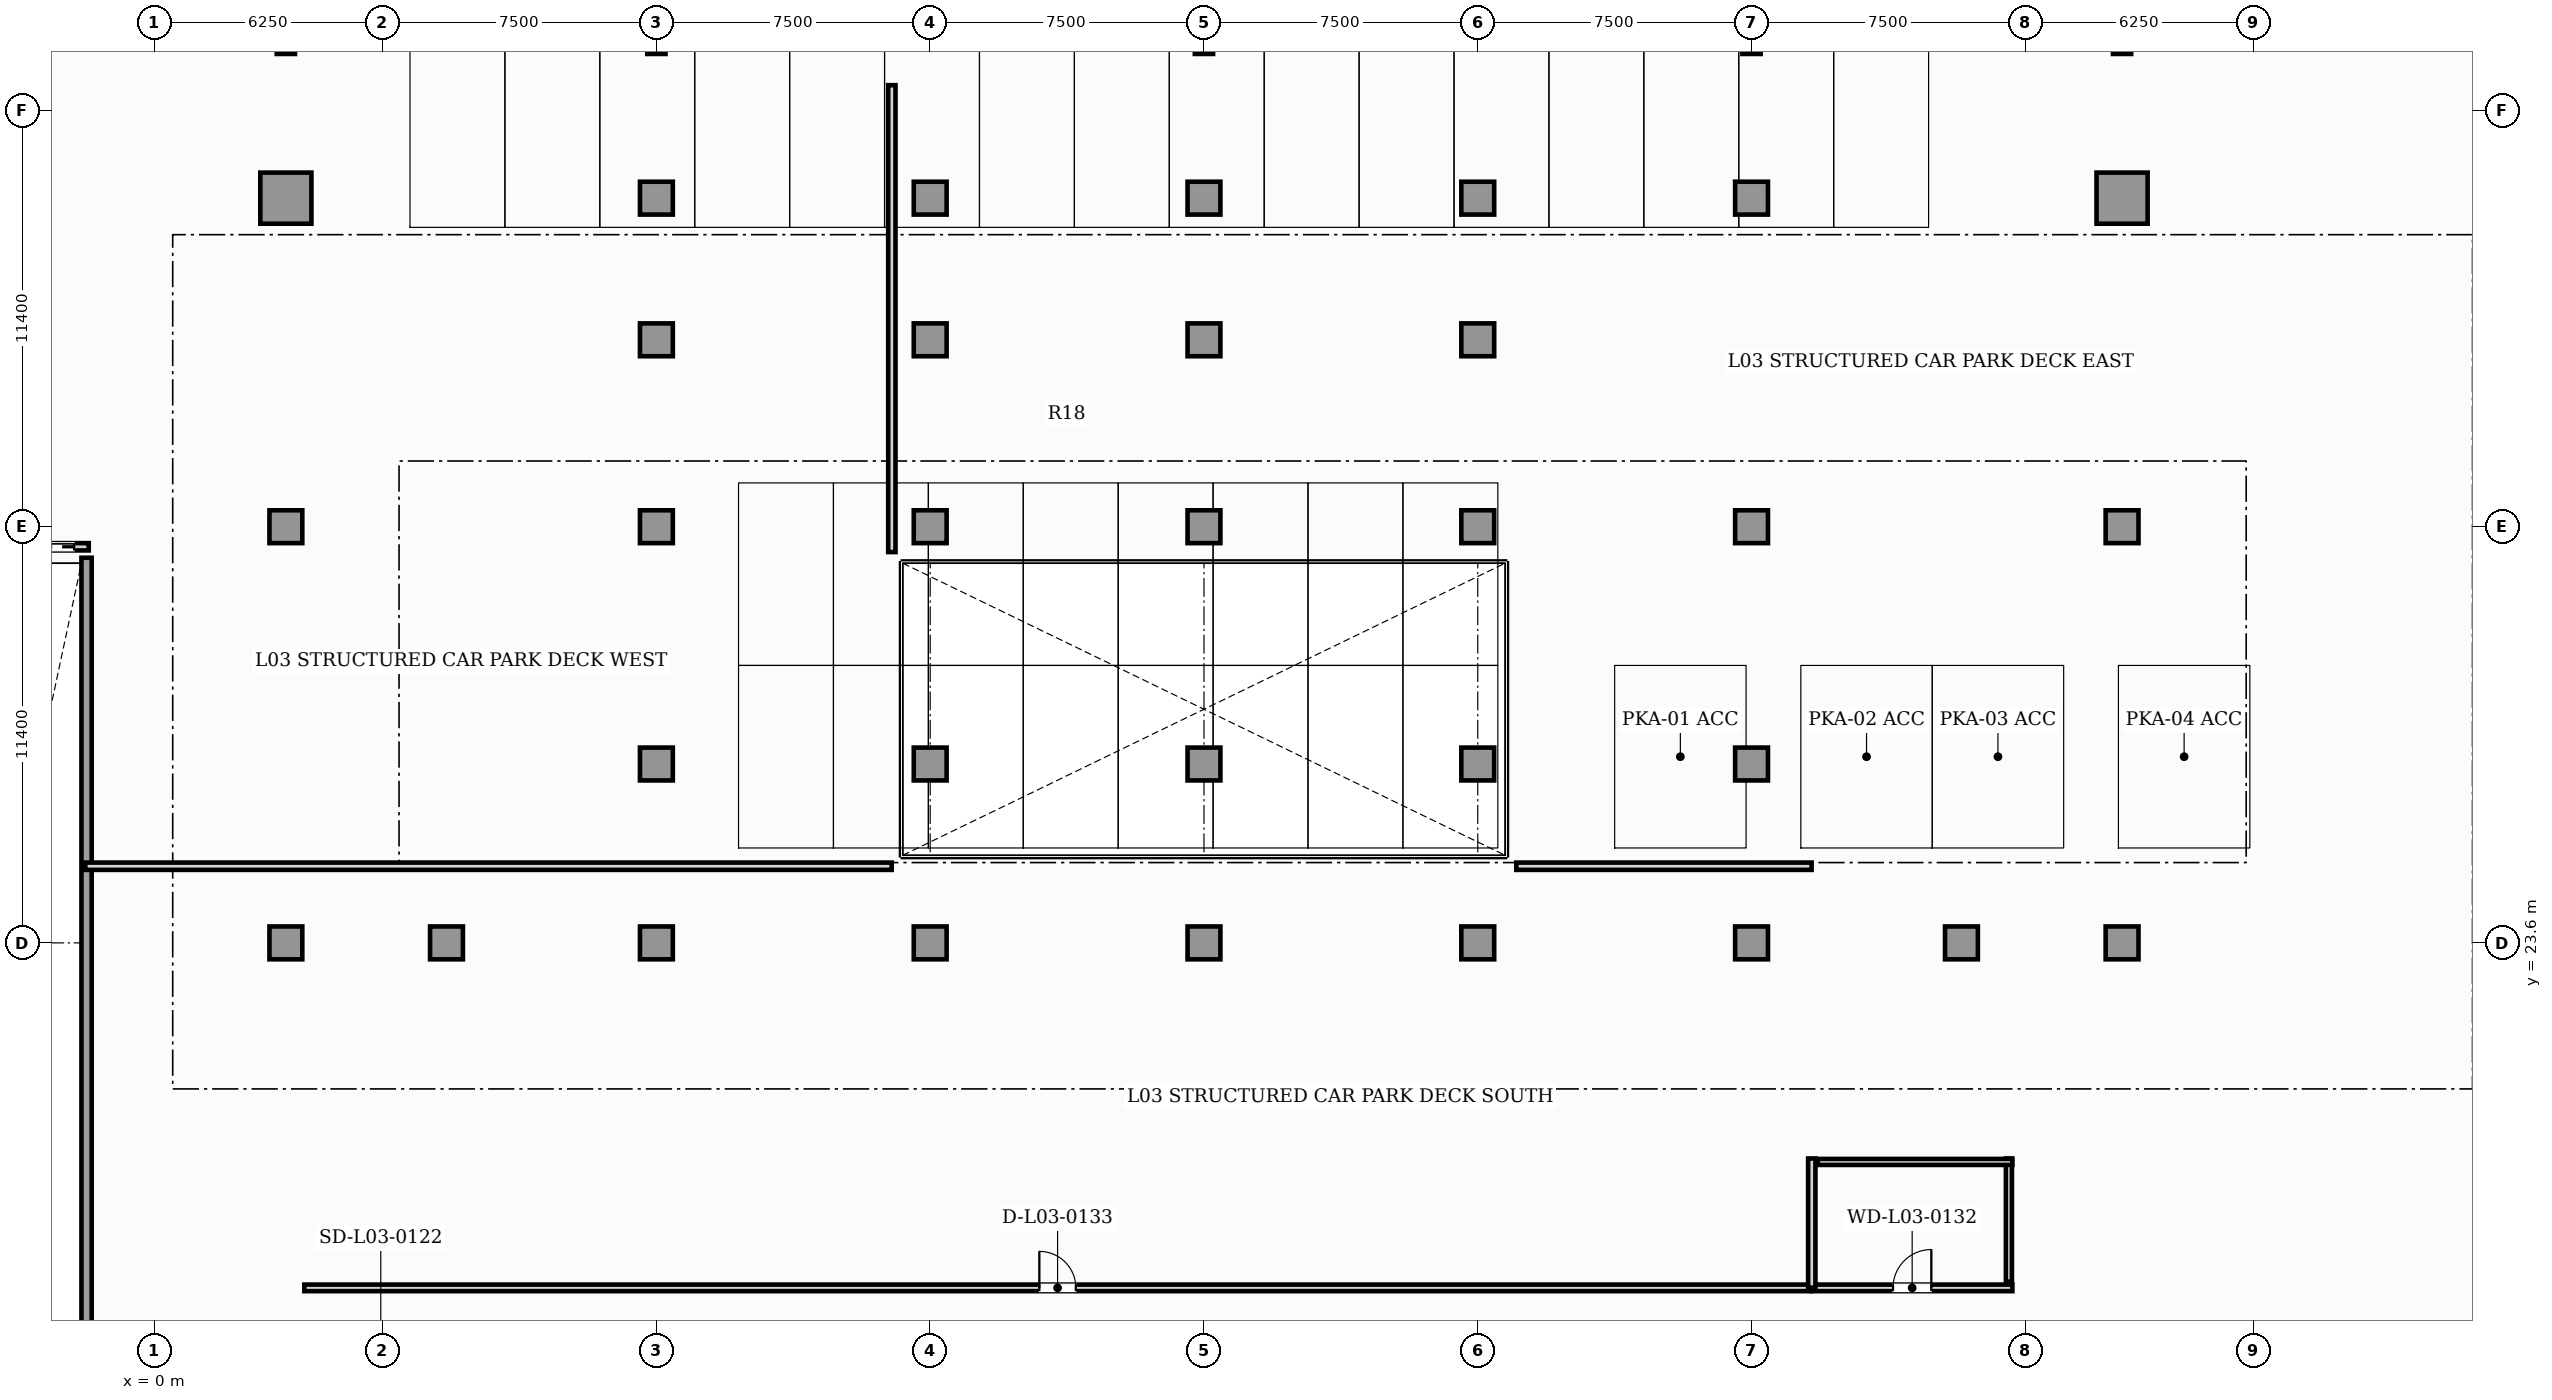
"""IFC4 building model, lengths in metres.
Left out: names, types, materials, properties, quantities, classifications, styles, units other than length and angle.
Written with IfcOpenShell. Run it as: python <this file> out.ifc"""

import sys

from ifc_helpers import new_model, si_unit, direction, frame, frame_2d, origin, origin_2d, place, context, subcontext, project, spatial, rectangle, hollow_rectangle, extrude, element, fill, save


model = new_model("IFC4")
c1 = context("Model", 3, precision=1e-05, world=origin(), true_north=direction((0.0, 1.0)))
c2 = subcontext(c1, "Body", "Model", "MODEL_VIEW")
j1 = project(units=[si_unit("LENGTHUNIT", "METRE"), si_unit("PLANEANGLEUNIT", "RADIAN")], contexts=[c1])
p1 = place(None, origin())
s1 = spatial("IfcSite", under=j1, at=p1, CompositionType="ELEMENT")
p2 = place(p1, origin())
s2 = spatial("IfcBuilding", under=s1, at=p2, CompositionType="ELEMENT")
p3 = place(p2, frame((0.0, 0.0, 15.0)))
s3 = spatial("IfcBuildingStorey", under=s2, at=p3, CompositionType="ELEMENT", Elevation=15.0)
p4 = place(p3, frame((-1.86, 3.88, 0.0), z_axis=(0.0, 0.0, 1.0), x_axis=(0.0, 1.0, 0.0)))
e1 = element("IfcWall", 1, at=p4, inside=s3, PredefinedType="SHEAR", context=c2, shape_type="SweptSolid", body=[
    extrude(rectangle(XDim=30.27, YDim=0.28, at=frame_2d((15.135, 0.0))), origin(), (0.0, 0.0, 1.0), 4.5),
])
for number, where, z_axis, x_axis in (
    (2, (53.9, 44.0, 0.0), (0.0, 0.0, 1.0), (1.0, 0.0, 0.0)),
    (3, (3.6, 44.0, 0.0), (0.0, 0.0, 1.0), (1.0, 0.0, 0.0)),
):
    element("IfcColumn", number, at=place(p3, frame(where, z_axis=z_axis, x_axis=x_axis)), inside=s3, PredefinedType="USERDEFINED", context=c2, shape_type="SweptSolid", body=[
        extrude(hollow_rectangle(XDim=1.4, YDim=1.4, WallThickness=0.08, at=origin_2d()), origin(), (0.0, 0.0, 1.0), 4.8),
    ])
for number, where, z_axis, x_axis in (
    (4, (3.6, 23.6, 0.0), (0.0, 0.0, 1.0), (1.0, 0.0, 0.0)),
    (5, (3.6, 35.0, 0.0), (0.0, 0.0, 1.0), (1.0, 0.0, 0.0)),
    (6, (13.75, 23.6, 0.0), (0.0, 0.0, 1.0), (1.0, 0.0, 0.0)),
    (7, (13.75, 35.0, 0.0), (0.0, 0.0, 1.0), (1.0, 0.0, 0.0)),
    (8, (13.75, 44.0, 0.0), (0.0, 0.0, 1.0), (1.0, 0.0, 0.0)),
    (9, (28.75, 23.6, 0.0), (0.0, 0.0, 1.0), (1.0, 0.0, 0.0)),
    (10, (28.75, 35.0, 0.0), (0.0, 0.0, 1.0), (1.0, 0.0, 0.0)),
    (11, (28.75, 44.0, 0.0), (0.0, 0.0, 1.0), (1.0, 0.0, 0.0)),
    (12, (43.75, 23.6, 0.0), (0.0, 0.0, 1.0), (1.0, 0.0, 0.0)),
    (13, (43.75, 35.0, 0.0), (0.0, 0.0, 1.0), (1.0, 0.0, 0.0)),
    (14, (43.75, 44.0, 0.0), (0.0, 0.0, 1.0), (1.0, 0.0, 0.0)),
    (15, (53.9, 23.6, 0.0), (0.0, 0.0, 1.0), (1.0, 0.0, 0.0)),
    (16, (53.9, 35.0, 0.0), (0.0, 0.0, 1.0), (1.0, 0.0, 0.0)),
    (17, (8.0, 23.6, 0.0), (0.0, 0.0, 1.0), (1.0, 0.0, 0.0)),
    (18, (21.25, 23.6, 0.0), (0.0, 0.0, 1.0), (1.0, 0.0, 0.0)),
    (19, (36.25, 23.6, 0.0), (0.0, 0.0, 1.0), (1.0, 0.0, 0.0)),
    (20, (49.5, 23.6, 0.0), (0.0, 0.0, 1.0), (1.0, 0.0, 0.0)),
    (21, (13.75, 28.5, 0.0), (0.0, 0.0, 1.0), (1.0, 0.0, 0.0)),
    (22, (21.25, 28.5, 0.0), (0.0, 0.0, 1.0), (1.0, 0.0, 0.0)),
    (23, (28.75, 28.5, 0.0), (0.0, 0.0, 1.0), (1.0, 0.0, 0.0)),
    (24, (36.25, 28.5, 0.0), (0.0, 0.0, 1.0), (1.0, 0.0, 0.0)),
    (25, (43.75, 28.5, 0.0), (0.0, 0.0, 1.0), (1.0, 0.0, 0.0)),
    (26, (21.25, 35.0, 0.0), (0.0, 0.0, 1.0), (1.0, 0.0, 0.0)),
    (27, (36.25, 35.0, 0.0), (0.0, 0.0, 1.0), (1.0, 0.0, 0.0)),
    (28, (13.75, 40.12, 0.0), (0.0, 0.0, 1.0), (1.0, 0.0, 0.0)),
    (29, (21.25, 40.12, 0.0), (0.0, 0.0, 1.0), (1.0, 0.0, 0.0)),
    (30, (28.75, 40.12, 0.0), (0.0, 0.0, 1.0), (1.0, 0.0, 0.0)),
    (31, (36.25, 40.12, 0.0), (0.0, 0.0, 1.0), (1.0, 0.0, 0.0)),
    (32, (21.25, 44.0, 0.0), (0.0, 0.0, 1.0), (1.0, 0.0, 0.0)),
    (33, (36.25, 44.0, 0.0), (0.0, 0.0, 1.0), (1.0, 0.0, 0.0)),
):
    element("IfcColumn", number, at=place(p3, frame(where, z_axis=z_axis, x_axis=x_axis)), inside=s3, PredefinedType="COLUMN", context=c2, shape_type="SweptSolid", body=[
        extrude(rectangle(XDim=0.9, YDim=0.9, at=origin_2d()), origin(), (0.0, 0.0, 1.0), 4.8),
    ])
for number, where, z_axis, x_axis in (
    (34, (3.6, 48.2, 0.0), (0.0, 0.0, 1.0), (1.0, 0.0, 0.0)),
    (35, (13.75, 48.2, 0.0), (0.0, 0.0, 1.0), (1.0, 0.0, 0.0)),
    (36, (28.75, 48.2, 0.0), (0.0, 0.0, 1.0), (1.0, 0.0, 0.0)),
    (37, (43.75, 48.2, 0.0), (0.0, 0.0, 1.0), (1.0, 0.0, 0.0)),
    (38, (53.9, 48.2, 0.0), (0.0, 0.0, 1.0), (1.0, 0.0, 0.0)),
):
    element("IfcColumn", number, at=place(p3, frame(where, z_axis=z_axis, x_axis=x_axis)), inside=s3, PredefinedType="COLUMN", context=c2, shape_type="SweptSolid", body=[
        extrude(hollow_rectangle(XDim=0.5, YDim=0.5, WallThickness=0.032, at=origin_2d()), origin(), (0.0, 0.0, 1.0), 4.8),
    ])
p5 = place(p3, frame((-8.6, 34.45, 0.0), z_axis=(0.0, 0.0, 1.0), x_axis=(1.0, 0.0, 0.0)))
e39 = element("IfcWall", 39, at=p5, inside=s3, PredefinedType="PARTITIONING", context=c2, shape_type="SweptSolid", body=[
    extrude(rectangle(XDim=6.8, YDim=0.2, at=frame_2d((3.4, 0.0))), origin(), (0.0, 0.0, 1.0), 4.5),
])
p6 = place(p5, frame((0.4, 0.0, 0.0)))
e40 = element("IfcOpeningElement", 40, at=p6, cuts=e39, PredefinedType="OPENING", context=c2, shape_type="SweptSolid", body=[
    extrude(rectangle(XDim=6.0, YDim=3.2, at=frame_2d((3.0, 1.6))), frame((0.0, 0.11, 0.0), z_axis=(0.0, -1.0, 0.0), x_axis=(1.0, 0.0, 0.0)), (0.0, 0.0, 1.0), 0.22),
])
p7 = place(p3, frame((45.405, 14.15, 0.0), z_axis=(0.0, 0.0, 1.0), x_axis=(1.0, 0.0, 0.0)))
e41 = element("IfcWall", 41, at=p7, inside=s3, PredefinedType="PARTITIONING", context=c2, shape_type="SweptSolid", body=[
    extrude(rectangle(XDim=5.49, YDim=0.18, at=frame_2d((2.745, 0.0))), origin(), (0.0, 0.0, 1.0), 4.5),
])
p8 = place(p7, frame((2.22, 0.0, 0.0)))
e42 = element("IfcOpeningElement", 42, at=p8, cuts=e41, PredefinedType="OPENING", context=c2, shape_type="SweptSolid", body=[
    extrude(rectangle(XDim=1.05, YDim=2.15, at=frame_2d((0.525, 1.075))), frame((0.0, 0.1, 0.0), z_axis=(0.0, -1.0, 0.0), x_axis=(1.0, 0.0, 0.0)), (0.0, 0.0, 1.0), 0.2),
])
p9 = place(p3, frame((4.105, 14.15, 0.0), z_axis=(0.0, 0.0, 1.0), x_axis=(1.0, 0.0, 0.0)))
e43 = element("IfcWall", 43, at=p9, inside=s3, PredefinedType="PARTITIONING", context=c2, shape_type="SweptSolid", body=[
    extrude(rectangle(XDim=41.27, YDim=0.18, at=frame_2d((20.635, 0.0))), origin(), (0.0, 0.0, 1.0), 4.5),
])
p10 = place(p9, frame((20.135, 0.0, 0.0)))
e44 = element("IfcOpeningElement", 44, at=p10, cuts=e43, PredefinedType="OPENING", context=c2, shape_type="SweptSolid", body=[
    extrude(rectangle(XDim=1.0, YDim=2.15, at=frame_2d((0.5, 1.075))), frame((0.0, 0.1, 0.0), z_axis=(0.0, -1.0, 0.0), x_axis=(1.0, 0.0, 0.0)), (0.0, 0.0, 1.0), 0.2),
])
p11 = place(p3, frame((45.4, 14.155, 0.0), z_axis=(0.0, 0.0, 1.0), x_axis=(0.0, 1.0, 0.0)))
e45 = element("IfcWall", 45, at=p11, inside=s3, PredefinedType="PARTITIONING", context=c2, shape_type="SweptSolid", body=[
    extrude(rectangle(XDim=3.54, YDim=0.2, at=frame_2d((1.77, 0.0))), origin(), (0.0, 0.0, 1.0), 4.5),
])
p12 = place(p3, frame((-1.895, 25.7, 0.0), z_axis=(0.0, 0.0, 1.0), x_axis=(1.0, 0.0, 0.0)))
e46 = element("IfcWall", 46, at=p12, inside=s3, PredefinedType="PARTITIONING", context=c2, shape_type="SweptSolid", body=[
    extrude(rectangle(XDim=22.09, YDim=0.2, at=frame_2d((11.045, 0.0))), origin(), (0.0, 0.0, 1.0), 4.5),
])
p13 = place(p3, frame((37.305, 25.7, 0.0), z_axis=(0.0, 0.0, 1.0), x_axis=(1.0, 0.0, 0.0)))
e47 = element("IfcWall", 47, at=p13, inside=s3, PredefinedType="PARTITIONING", context=c2, shape_type="SweptSolid", body=[
    extrude(rectangle(XDim=8.09, YDim=0.2, at=frame_2d((4.045, 0.0))), origin(), (0.0, 0.0, 1.0), 4.5),
])
p14 = place(p3, frame((20.2, 34.305, 0.0), z_axis=(0.0, 0.0, 1.0), x_axis=(0.0, 1.0, 0.0)))
e48 = element("IfcWall", 48, at=p14, inside=s3, PredefinedType="PARTITIONING", context=c2, shape_type="SweptSolid", body=[
    extrude(rectangle(XDim=12.79, YDim=0.2, at=frame_2d((6.395, 0.0))), origin(), (0.0, 0.0, 1.0), 4.5),
])
p15 = place(p3, frame((50.8, 14.315, 0.0), z_axis=(0.0, 0.0, 1.0), x_axis=(0.0, 1.0, 0.0)))
e49 = element("IfcWall", 49, at=p15, inside=s3, PredefinedType="PLUMBINGWALL", context=c2, shape_type="SweptSolid", body=[
    extrude(rectangle(XDim=3.38, YDim=0.165, at=frame_2d((1.69, 0.0))), origin(), (0.0, 0.0, 1.0), 4.5),
])
p16 = place(p3, frame((50.895, 17.6, 0.0), z_axis=(0.0, 0.0, 1.0), x_axis=(-1.0, 0.0, 0.0)))
e50 = element("IfcWall", 50, at=p16, inside=s3, PredefinedType="PLUMBINGWALL", context=c2, shape_type="SweptSolid", body=[
    extrude(rectangle(XDim=5.33, YDim=0.165, at=frame_2d((2.665, 0.0))), origin(), (0.0, 0.0, 1.0), 4.5),
])
p17 = place(p6, origin())
e51 = element("IfcDoor", 51, at=p17, inside=s3, OperationType="ROLLINGUP", PredefinedType="GATE", context=c2, shape_type="SweptSolid", body=[
    extrude(rectangle(XDim=6.0, YDim=3.2, at=frame_2d((3.0, 1.6))), frame((0.0, 0.025, 0.0), z_axis=(0.0, -1.0, 0.0), x_axis=(1.0, 0.0, 0.0)), (0.0, 0.0, 1.0), 0.05),
])
fill(e40, e51)
p18 = place(p8, origin())
e52 = element("IfcDoor", 52, at=p18, inside=s3, OperationType="SINGLE_SWING_RIGHT", PredefinedType="DOOR", context=c2, shape_type="SweptSolid", body=[
    extrude(rectangle(XDim=1.05, YDim=2.15, at=frame_2d((0.525, 1.075))), frame((0.0, 0.025, 0.0), z_axis=(0.0, -1.0, 0.0), x_axis=(1.0, 0.0, 0.0)), (0.0, 0.0, 1.0), 0.05),
])
fill(e42, e52)
p19 = place(p10, origin())
e53 = element("IfcDoor", 53, at=p19, inside=s3, OperationType="SINGLE_SWING_LEFT", PredefinedType="DOOR", context=c2, shape_type="SweptSolid", body=[
    extrude(rectangle(XDim=1.0, YDim=2.15, at=frame_2d((0.5, 1.075))), frame((0.0, 0.025, 0.0), z_axis=(0.0, -1.0, 0.0), x_axis=(1.0, 0.0, 0.0)), (0.0, 0.0, 1.0), 0.05),
])
fill(e44, e53)
save(model, sys.argv[1])
